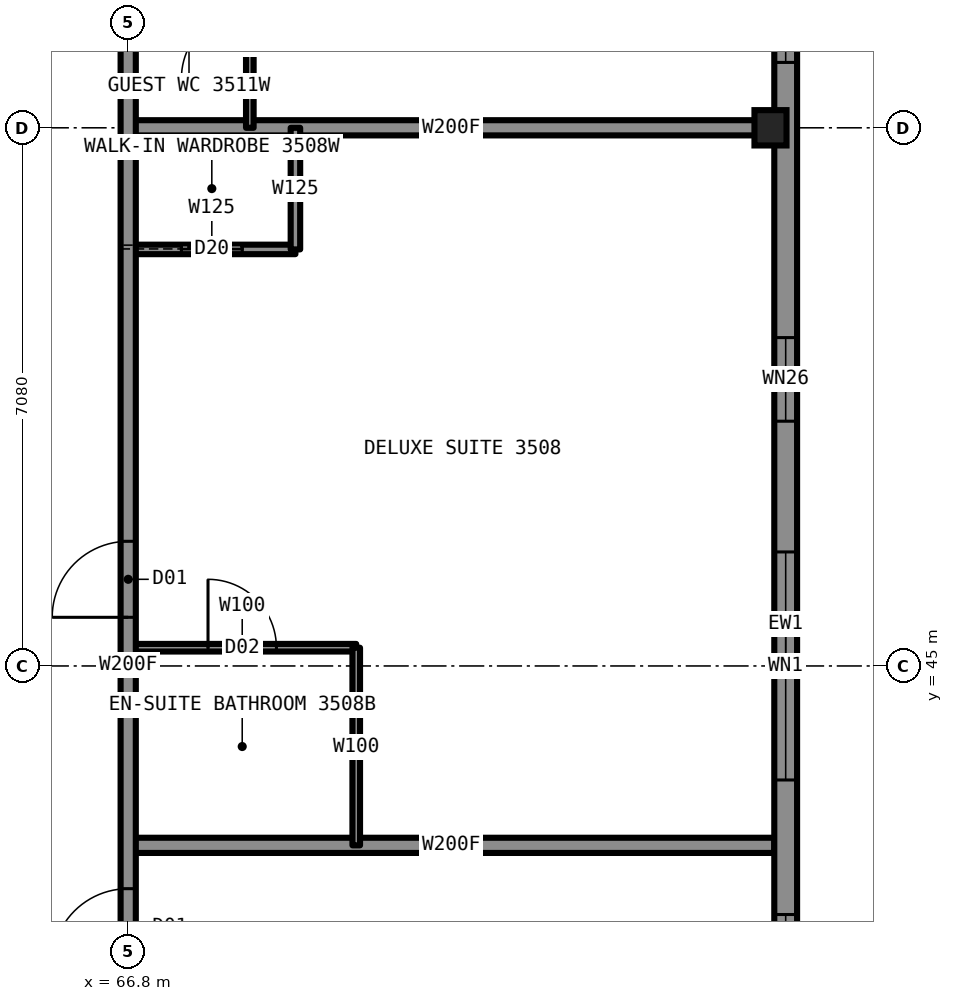
"""IFC4 building model, lengths in metres.
Left out: names, types, materials, properties, quantities, classifications, styles, units other than length and angle.
Written with IfcOpenShell. Run it as: python <this file> out.ifc"""

import sys

from ifc_helpers import new_model, si_unit, direction, frame, frame_2d, origin, origin_2d, place, context, subcontext, project, spatial, rectangle, i_section, extrude, element, fill, save


model = new_model("IFC4")
c1 = context("Model", 3, precision=1e-05, world=origin(), true_north=direction((0.0, 1.0)))
c2 = subcontext(c1, "Body", "Model", "MODEL_VIEW")
j1 = project(units=[si_unit("LENGTHUNIT", "METRE"), si_unit("PLANEANGLEUNIT", "RADIAN")], contexts=[c1])
p1 = place(None, origin())
s1 = spatial("IfcSite", under=j1, at=p1, CompositionType="ELEMENT")
p2 = place(p1, origin())
s2 = spatial("IfcBuilding", under=s1, at=p2, CompositionType="ELEMENT")
p3 = place(p2, frame((0.0, 0.0, 124.9)))
s3 = spatial("IfcBuildingStorey", under=s2, at=p3, CompositionType="ELEMENT", Elevation=124.9)
p4 = place(p3, frame((75.25, 52.08, 0.0), z_axis=(0.0, 0.0, 1.0), x_axis=(1.0, 0.0, 0.0)))
e1 = element("IfcColumn", 1, at=p4, inside=s3, PredefinedType="COLUMN", context=c2, shape_type="SweptSolid", body=[
    extrude(i_section(OverallWidth=0.422, OverallDepth=0.465, WebThickness=0.045, FlangeThickness=0.073, at=origin_2d()), origin(), (0.0, 0.0, 1.0), 3.5),
])
p5 = place(p3, frame((66.8, 42.64, 0.0), z_axis=(0.0, 0.0, 1.0), x_axis=(1.0, 0.0, 0.0)))
e2 = element("IfcWall", 2, at=p5, inside=s3, PredefinedType="PARTITIONING", context=c2, shape_type="SweptSolid", body=[
    extrude(rectangle(XDim=8.5, YDim=0.2, at=frame_2d((4.25, 0.0))), origin(), (0.0, 0.0, 1.0), 2.731),
])
p6 = place(p3, frame((66.8, 45.24, 0.0), z_axis=(0.0, 0.0, 1.0), x_axis=(1.0, 0.0, 0.0)))
e3 = element("IfcWall", 3, at=p6, inside=s3, PredefinedType="PARTITIONING", context=c2, shape_type="SweptSolid", body=[
    extrude(rectangle(XDim=3.0, YDim=0.1, at=frame_2d((1.5, 0.0))), origin(), (0.0, 0.0, 1.0), 3.33),
])
p7 = place(p6, frame((1.05, 0.0, 0.0)))
e4 = element("IfcOpeningElement", 4, at=p7, cuts=e3, PredefinedType="OPENING", context=c2, shape_type="SweptSolid", body=[
    extrude(rectangle(XDim=0.9, YDim=2.1, at=frame_2d((0.45, 1.05))), frame((0.0, 0.06, 0.0), z_axis=(0.0, -1.0, 0.0), x_axis=(1.0, 0.0, 0.0)), (0.0, 0.0, 1.0), 0.12),
])
p8 = place(p3, frame((66.8, 50.48, 0.0), z_axis=(0.0, 0.0, 1.0), x_axis=(1.0, 0.0, 0.0)))
e5 = element("IfcWall", 5, at=p8, inside=s3, PredefinedType="PARTITIONING", context=c2, shape_type="SweptSolid", body=[
    extrude(rectangle(XDim=2.2, YDim=0.125, at=frame_2d((1.1, 0.0))), origin(), (0.0, 0.0, 1.0), 3.33),
])
p9 = place(p8, frame((0.7, 0.0, 0.0)))
e6 = element("IfcOpeningElement", 6, at=p9, cuts=e5, PredefinedType="OPENING", context=c2, shape_type="SweptSolid", body=[
    extrude(rectangle(XDim=0.8, YDim=2.1, at=frame_2d((0.4, 1.05))), frame((0.0, 0.073, 0.0), z_axis=(0.0, -1.0, 0.0), x_axis=(1.0, 0.0, 0.0)), (0.0, 0.0, 1.0), 0.145),
])
p10 = place(p3, frame((66.8, 52.08, 0.0), z_axis=(0.0, 0.0, 1.0), x_axis=(1.0, 0.0, 0.0)))
e7 = element("IfcWall", 7, at=p10, inside=s3, PredefinedType="PARTITIONING", context=c2, shape_type="SweptSolid", body=[
    extrude(rectangle(XDim=8.5, YDim=0.2, at=frame_2d((4.25, 0.0))), origin(), (0.0, 0.0, 1.0), 2.573),
])
p11 = place(p3, frame((66.8, 33.22, 0.0), z_axis=(0.0, 0.0, 1.0), x_axis=(0.0, 1.0, 0.0)))
e8 = element("IfcWall", 8, at=p11, inside=s3, PredefinedType="PARTITIONING", context=c2, shape_type="SweptSolid", body=[
    extrude(rectangle(XDim=23.58, YDim=0.2, at=frame_2d((11.79, 0.0))), origin(), (0.0, 0.0, 1.0), 3.33),
])
p12 = place(p11, frame((7.85, 0.0, 0.0)))
e9 = element("IfcOpeningElement", 9, at=p12, cuts=e8, PredefinedType="OPENING", context=c2, shape_type="SweptSolid", body=[
    extrude(rectangle(XDim=1.0, YDim=2.2, at=frame_2d((0.5, 1.1))), frame((0.0, 0.11, 0.0), z_axis=(0.0, -1.0, 0.0), x_axis=(1.0, 0.0, 0.0)), (0.0, 0.0, 1.0), 0.22),
])
p13 = place(p11, frame((12.42, 0.0, 0.0)))
e10 = element("IfcOpeningElement", 10, at=p13, cuts=e8, PredefinedType="OPENING", context=c2, shape_type="SweptSolid", body=[
    extrude(rectangle(XDim=1.0, YDim=2.2, at=frame_2d((0.5, 1.1))), frame((0.0, 0.11, 0.0), z_axis=(0.0, -1.0, 0.0), x_axis=(1.0, 0.0, 0.0)), (0.0, 0.0, 1.0), 0.22),
])
p14 = place(p11, frame((21.83, 0.0, 0.0)))
e11 = element("IfcOpeningElement", 11, at=p14, cuts=e8, PredefinedType="OPENING", context=c2, shape_type="SweptSolid", body=[
    extrude(rectangle(XDim=1.1, YDim=2.2, at=frame_2d((0.55, 1.1))), frame((0.0, 0.11, 0.0), z_axis=(0.0, -1.0, 0.0), x_axis=(1.0, 0.0, 0.0)), (0.0, 0.0, 1.0), 0.22),
])
p15 = place(p11, frame((0.63, 0.0, 0.0)))
e12 = element("IfcOpeningElement", 12, at=p15, cuts=e8, PredefinedType="OPENING", context=c2, shape_type="SweptSolid", body=[
    extrude(rectangle(XDim=1.1, YDim=2.2, at=frame_2d((0.55, 1.1))), frame((0.0, 0.11, 0.0), z_axis=(0.0, -1.0, 0.0), x_axis=(1.0, 0.0, 0.0)), (0.0, 0.0, 1.0), 0.22),
])
p16 = place(p3, frame((68.4, 52.08, 0.0), z_axis=(0.0, 0.0, 1.0), x_axis=(0.0, 1.0, 0.0)))
e13 = element("IfcWall", 13, at=p16, inside=s3, PredefinedType="PARTITIONING", context=c2, shape_type="SweptSolid", body=[
    extrude(rectangle(XDim=2.2, YDim=0.1, at=frame_2d((1.1, 0.0))), origin(), (0.0, 0.0, 1.0), 3.33),
])
p17 = place(p16, frame((0.65, 0.0, 0.0)))
e14 = element("IfcOpeningElement", 14, at=p17, cuts=e13, PredefinedType="OPENING", context=c2, shape_type="SweptSolid", body=[
    extrude(rectangle(XDim=0.9, YDim=2.1, at=frame_2d((0.45, 1.05))), frame((0.0, 0.06, 0.0), z_axis=(0.0, -1.0, 0.0), x_axis=(1.0, 0.0, 0.0)), (0.0, 0.0, 1.0), 0.12),
])
p18 = place(p3, frame((69.0, 50.48, 0.0), z_axis=(0.0, 0.0, 1.0), x_axis=(0.0, 1.0, 0.0)))
e15 = element("IfcWall", 15, at=p18, inside=s3, PredefinedType="PARTITIONING", context=c2, shape_type="SweptSolid", body=[
    extrude(rectangle(XDim=1.6, YDim=0.125, at=frame_2d((0.8, 0.0))), origin(), (0.0, 0.0, 1.0), 3.33),
])
p19 = place(p3, frame((69.8, 42.64, 0.0), z_axis=(0.0, 0.0, 1.0), x_axis=(0.0, 1.0, 0.0)))
e16 = element("IfcWall", 16, at=p19, inside=s3, PredefinedType="PARTITIONING", context=c2, shape_type="SweptSolid", body=[
    extrude(rectangle(XDim=2.6, YDim=0.1, at=frame_2d((1.3, 0.0))), origin(), (0.0, 0.0, 1.0), 3.33),
])
p20 = place(p3, frame((75.45, 29.9, 0.0), z_axis=(0.0, 0.0, 1.0), x_axis=(0.0, 1.0, 0.0)))
e17 = element("IfcWall", 17, at=p20, inside=s3, PredefinedType="SOLIDWALL", context=c2, shape_type="SweptSolid", body=[
    extrude(rectangle(XDim=30.2, YDim=0.3, at=frame_2d((15.1, 0.0))), origin(), (0.0, 0.0, 1.0), 2.83),
])
p21 = place(p20, frame((0.85, 0.0, 0.5)))
e18 = element("IfcOpeningElement", 18, at=p21, cuts=e17, PredefinedType="OPENING", context=c2, shape_type="SweptSolid", body=[
    extrude(rectangle(XDim=1.6, YDim=2.0, at=frame_2d((0.8, 1.0))), frame((0.0, 0.16, 0.0), z_axis=(0.0, -1.0, 0.0), x_axis=(1.0, 0.0, 0.0)), (0.0, 0.0, 1.0), 0.32),
])
p22 = place(p20, frame((4.16, 0.0, 0.5)))
e19 = element("IfcOpeningElement", 19, at=p22, cuts=e17, PredefinedType="OPENING", context=c2, shape_type="SweptSolid", body=[
    extrude(rectangle(XDim=3.0, YDim=2.0, at=frame_2d((1.5, 1.0))), frame((0.0, 0.16, 0.0), z_axis=(0.0, -1.0, 0.0), x_axis=(1.0, 0.0, 0.0)), (0.0, 0.0, 1.0), 0.32),
])
p23 = place(p20, frame((8.88, 0.0, 0.5)))
e20 = element("IfcOpeningElement", 20, at=p23, cuts=e17, PredefinedType="OPENING", context=c2, shape_type="SweptSolid", body=[
    extrude(rectangle(XDim=3.0, YDim=2.0, at=frame_2d((1.5, 1.0))), frame((0.0, 0.16, 0.0), z_axis=(0.0, -1.0, 0.0), x_axis=(1.0, 0.0, 0.0)), (0.0, 0.0, 1.0), 0.32),
])
p24 = place(p20, frame((18.32, 0.0, 0.5)))
e21 = element("IfcOpeningElement", 21, at=p24, cuts=e17, PredefinedType="OPENING", context=c2, shape_type="SweptSolid", body=[
    extrude(rectangle(XDim=3.0, YDim=2.0, at=frame_2d((1.5, 1.0))), frame((0.0, 0.16, 0.0), z_axis=(0.0, -1.0, 0.0), x_axis=(1.0, 0.0, 0.0)), (0.0, 0.0, 1.0), 0.32),
])
p25 = place(p20, frame((23.04, 0.0, 0.5)))
e22 = element("IfcOpeningElement", 22, at=p25, cuts=e17, PredefinedType="OPENING", context=c2, shape_type="SweptSolid", body=[
    extrude(rectangle(XDim=3.0, YDim=2.0, at=frame_2d((1.5, 1.0))), frame((0.0, 0.16, 0.0), z_axis=(0.0, -1.0, 0.0), x_axis=(1.0, 0.0, 0.0)), (0.0, 0.0, 1.0), 0.32),
])
p26 = place(p20, frame((27.75, 0.0, 0.5)))
e23 = element("IfcOpeningElement", 23, at=p26, cuts=e17, PredefinedType="OPENING", context=c2, shape_type="SweptSolid", body=[
    extrude(rectangle(XDim=1.6, YDim=2.0, at=frame_2d((0.8, 1.0))), frame((0.0, 0.16, 0.0), z_axis=(0.0, -1.0, 0.0), x_axis=(1.0, 0.0, 0.0)), (0.0, 0.0, 1.0), 0.32),
])
p27 = place(p12, origin())
e24 = element("IfcDoor", 24, at=p27, inside=s3, OperationType="SINGLE_SWING_LEFT", PredefinedType="DOOR", context=c2, shape_type="SweptSolid", body=[
    extrude(rectangle(XDim=1.0, YDim=2.2, at=frame_2d((0.5, 1.1))), frame((0.0, 0.025, 0.0), z_axis=(0.0, -1.0, 0.0), x_axis=(1.0, 0.0, 0.0)), (0.0, 0.0, 1.0), 0.05),
])
fill(e9, e24)
p28 = place(p13, origin())
e25 = element("IfcDoor", 25, at=p28, inside=s3, OperationType="SINGLE_SWING_LEFT", PredefinedType="DOOR", context=c2, shape_type="SweptSolid", body=[
    extrude(rectangle(XDim=1.0, YDim=2.2, at=frame_2d((0.5, 1.1))), frame((0.0, 0.025, 0.0), z_axis=(0.0, -1.0, 0.0), x_axis=(1.0, 0.0, 0.0)), (0.0, 0.0, 1.0), 0.05),
])
fill(e10, e25)
p29 = place(p7, origin())
e26 = element("IfcDoor", 26, at=p29, inside=s3, OperationType="SINGLE_SWING_RIGHT", PredefinedType="DOOR", context=c2, shape_type="SweptSolid", body=[
    extrude(rectangle(XDim=0.9, YDim=2.1, at=frame_2d((0.45, 1.05))), frame((0.0, 0.025, 0.0), z_axis=(0.0, -1.0, 0.0), x_axis=(1.0, 0.0, 0.0)), (0.0, 0.0, 1.0), 0.05),
])
fill(e4, e26)
p30 = place(p9, origin())
e27 = element("IfcDoor", 27, at=p30, inside=s3, OperationType="SLIDING_TO_LEFT", PredefinedType="DOOR", context=c2, shape_type="SweptSolid", body=[
    extrude(rectangle(XDim=0.8, YDim=2.1, at=frame_2d((0.4, 1.05))), frame((0.0, 0.025, 0.0), z_axis=(0.0, -1.0, 0.0), x_axis=(1.0, 0.0, 0.0)), (0.0, 0.0, 1.0), 0.05),
])
fill(e6, e27)
p31 = place(p17, origin())
e28 = element("IfcDoor", 28, at=p31, inside=s3, OperationType="SINGLE_SWING_LEFT", PredefinedType="DOOR", context=c2, shape_type="SweptSolid", body=[
    extrude(rectangle(XDim=0.9, YDim=2.1, at=frame_2d((0.45, 1.05))), frame((0.0, 0.025, 0.0), z_axis=(0.0, -1.0, 0.0), x_axis=(1.0, 0.0, 0.0)), (0.0, 0.0, 1.0), 0.05),
])
fill(e14, e28)
p32 = place(p23, origin())
e29 = element("IfcWindow", 29, at=p32, inside=s3, PartitioningType="SINGLE_PANEL", PredefinedType="WINDOW", context=c2, shape_type="SweptSolid", body=[
    extrude(rectangle(XDim=3.0, YDim=2.0, at=frame_2d((1.5, 1.0))), frame((0.0, 0.03, 0.0), z_axis=(0.0, -1.0, 0.0), x_axis=(1.0, 0.0, 0.0)), (0.0, 0.0, 1.0), 0.06),
])
fill(e20, e29)
p33 = place(p24, origin())
e30 = element("IfcWindow", 30, at=p33, inside=s3, PartitioningType="SINGLE_PANEL", PredefinedType="WINDOW", context=c2, shape_type="SweptSolid", body=[
    extrude(rectangle(XDim=3.0, YDim=2.0, at=frame_2d((1.5, 1.0))), frame((0.0, 0.03, 0.0), z_axis=(0.0, -1.0, 0.0), x_axis=(1.0, 0.0, 0.0)), (0.0, 0.0, 1.0), 0.06),
])
fill(e21, e30)
p34 = place(p25, origin())
e31 = element("IfcWindow", 31, at=p34, inside=s3, PartitioningType="SINGLE_PANEL", PredefinedType="WINDOW", context=c2, shape_type="SweptSolid", body=[
    extrude(rectangle(XDim=3.0, YDim=2.0, at=frame_2d((1.5, 1.0))), frame((0.0, 0.03, 0.0), z_axis=(0.0, -1.0, 0.0), x_axis=(1.0, 0.0, 0.0)), (0.0, 0.0, 1.0), 0.06),
])
fill(e22, e31)
save(model, sys.argv[1])
